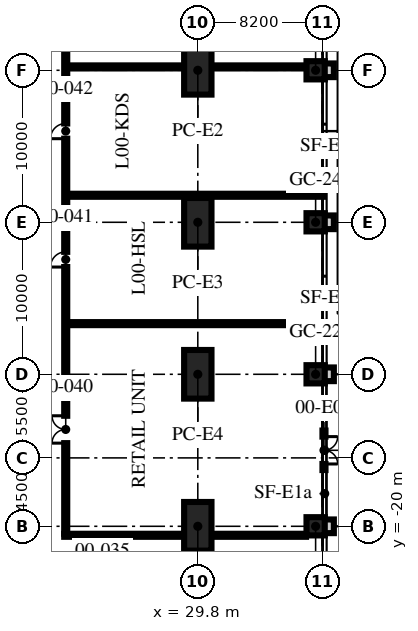
"""IFC4 building model, lengths in metres.
Left out: names, types, materials, properties, quantities, classifications, styles, units other than length and angle.
Written with IfcOpenShell. Run it as: python <this file> out.ifc"""

import sys

from ifc_helpers import new_model, si_unit, direction, frame, frame_2d, origin, origin_2d, place, context, subcontext, project, spatial, rectangle, hollow_rectangle, extrude, element, fill, save


model = new_model("IFC4")
c1 = context("Model", 3, precision=1e-05, world=origin(), true_north=direction((0.0, 1.0)))
c2 = subcontext(c1, "Body", "Model", "MODEL_VIEW")
j1 = project(units=[si_unit("LENGTHUNIT", "METRE"), si_unit("PLANEANGLEUNIT", "RADIAN")], contexts=[c1])
p1 = place(None, origin())
s1 = spatial("IfcSite", under=j1, at=p1, CompositionType="ELEMENT")
p2 = place(p1, origin())
s2 = spatial("IfcBuilding", under=s1, at=p2, CompositionType="ELEMENT")
p3 = place(p2, origin())
s3 = spatial("IfcBuildingStorey", under=s2, at=p3, CompositionType="ELEMENT", Elevation=0.0)
for number, where, z_axis, x_axis in (
    (1, (29.8, 10.0, 0.0), (0.0, 0.0, 1.0), (0.0, 1.0, 0.0)),
    (2, (29.8, 0.0, 0.0), (0.0, 0.0, 1.0), (0.0, 1.0, 0.0)),
    (3, (29.8, -10.0, 0.0), (0.0, 0.0, 1.0), (0.0, 1.0, 0.0)),
    (4, (29.8, -20.0, 0.0), (0.0, 0.0, 1.0), (0.0, 1.0, 0.0)),
):
    element("IfcColumn", number, at=place(p3, frame(where, z_axis=z_axis, x_axis=x_axis)), inside=s3, PredefinedType="COLUMN", context=c2, shape_type="SweptSolid", body=[
        extrude(hollow_rectangle(XDim=3.2, YDim=1.8, WallThickness=0.2, at=origin_2d()), origin(), (0.0, 0.0, 1.0), 6.0),
    ])
for number, where, z_axis, x_axis in (
    (5, (37.55, -20.0, 0.0), (0.0, 0.0, 1.0), (1.0, 0.0, 0.0)),
    (6, (37.55, -10.0, 0.0), (0.0, 0.0, 1.0), (1.0, 0.0, 0.0)),
    (7, (37.55, 0.0, 0.0), (0.0, 0.0, 1.0), (1.0, 0.0, 0.0)),
    (8, (37.55, 10.0, 0.0), (0.0, 0.0, 1.0), (1.0, 0.0, 0.0)),
):
    element("IfcColumn", number, at=place(p3, frame(where, z_axis=z_axis, x_axis=x_axis)), inside=s3, PredefinedType="COLUMN", context=c2, shape_type="SweptSolid", body=[
        extrude(rectangle(XDim=1.2, YDim=1.2, at=origin_2d()), origin(), (0.0, 0.0, 1.0), 6.0),
    ])
for number, where, z_axis, x_axis in (
    (9, (38.375, -20.45, -0.2), (0.0, 0.0, 1.0), (0.0, 1.0, 0.0)),
    (10, (38.375, -10.45, -0.2), (0.0, 0.0, 1.0), (0.0, 1.0, 0.0)),
    (11, (38.375, -0.45, -0.2), (0.0, 0.0, 1.0), (0.0, 1.0, 0.0)),
    (12, (38.375, 9.55, -0.2), (0.0, 0.0, 1.0), (0.0, 1.0, 0.0)),
):
    element("IfcWall", number, at=place(p3, frame(where, z_axis=z_axis, x_axis=x_axis)), inside=s3, PredefinedType="SOLIDWALL", context=c2, shape_type="SweptSolid", body=[
        extrude(rectangle(XDim=0.9, YDim=0.75, at=frame_2d((0.45, 0.0))), origin(), (0.0, 0.0, 1.0), 6.2),
    ])
p4 = place(p3, frame((38.1, -16.3, 0.0), z_axis=(0.0, 0.0, 1.0), x_axis=(0.0, 1.0, 0.0)))
e13 = element("IfcWall", 13, at=p4, inside=s3, PredefinedType="ELEMENTEDWALL", context=c2, shape_type="SweptSolid", body=[
    extrude(rectangle(XDim=2.6, YDim=0.2, at=frame_2d((1.3, 0.0))), origin(), (0.0, 0.0, 1.0), 3.2),
])
p5 = place(p4, frame((2.2, 0.0, 0.0), z_axis=(0.0, 0.0, 1.0), x_axis=(-1.0, 0.0, 0.0)))
e14 = element("IfcOpeningElement", 14, at=p5, cuts=e13, PredefinedType="OPENING", context=c2, shape_type="SweptSolid", body=[
    extrude(rectangle(XDim=1.8, YDim=2.7, at=frame_2d((0.9, 1.35))), frame((0.0, 0.11, 0.0), z_axis=(0.0, -1.0, 0.0), x_axis=(1.0, 0.0, 0.0)), (0.0, 0.0, 1.0), 0.22),
])
p6 = place(p3, frame((21.011, -20.591, 0.0), z_axis=(0.0, 0.0, 1.0), x_axis=(1.0, 0.0, 0.0)))
e15 = element("IfcWall", 15, at=p6, inside=s3, PredefinedType="SOLIDWALL", context=c2, shape_type="SweptSolid", body=[
    extrude(rectangle(XDim=7.859, YDim=0.2, at=frame_2d((3.929, 0.0))), origin(), (0.0, 0.0, 1.0), 4.5),
])
p7 = place(p3, frame((30.73, -20.591, 0.0), z_axis=(0.0, 0.0, 1.0), x_axis=(1.0, 0.0, 0.0)))
e16 = element("IfcWall", 16, at=p7, inside=s3, PredefinedType="SOLIDWALL", context=c2, shape_type="SweptSolid", body=[
    extrude(rectangle(XDim=6.19, YDim=0.2, at=frame_2d((3.095, 0.0))), origin(), (0.0, 0.0, 1.0), 4.7),
])
p8 = place(p3, frame((21.111, -20.491, 0.0), z_axis=(0.0, 0.0, 1.0), x_axis=(0.0, 1.0, 0.0)))
e17 = element("IfcWall", 17, at=p8, inside=s3, PredefinedType="SOLIDWALL", context=c2, shape_type="SweptSolid", body=[
    extrude(rectangle(XDim=42.022, YDim=0.2, at=frame_2d((21.011, 0.0))), origin(), (0.0, 0.0, 1.0), 4.5),
])
p9 = place(p8, frame((5.962, 0.0, 0.0)))
e18 = element("IfcOpeningElement", 18, at=p9, cuts=e17, PredefinedType="OPENING", context=c2, shape_type="SweptSolid", body=[
    extrude(rectangle(XDim=1.8, YDim=2.4, at=frame_2d((0.9, 1.2))), frame((0.0, 0.11, 0.0), z_axis=(0.0, -1.0, 0.0), x_axis=(1.0, 0.0, 0.0)), (0.0, 0.0, 1.0), 0.22),
])
p10 = place(p8, frame((17.546, 0.0, 0.0)))
e19 = element("IfcOpeningElement", 19, at=p10, cuts=e17, PredefinedType="OPENING", context=c2, shape_type="SweptSolid", body=[
    extrude(rectangle(XDim=1.0, YDim=2.1, at=frame_2d((0.5, 1.05))), frame((0.0, 0.11, 0.0), z_axis=(0.0, -1.0, 0.0), x_axis=(1.0, 0.0, 0.0)), (0.0, 0.0, 1.0), 0.22),
])
p11 = place(p8, frame((25.991, 0.0, 0.0)))
e20 = element("IfcOpeningElement", 20, at=p11, cuts=e17, PredefinedType="OPENING", context=c2, shape_type="SweptSolid", body=[
    extrude(rectangle(XDim=1.0, YDim=2.1, at=frame_2d((0.5, 1.05))), frame((0.0, 0.11, 0.0), z_axis=(0.0, -1.0, 0.0), x_axis=(1.0, 0.0, 0.0)), (0.0, 0.0, 1.0), 0.22),
])
p12 = place(p8, frame((35.917, 0.0, 0.0)))
e21 = element("IfcOpeningElement", 21, at=p12, cuts=e17, PredefinedType="OPENING", context=c2, shape_type="SweptSolid", body=[
    extrude(rectangle(XDim=1.0, YDim=2.1, at=frame_2d((0.5, 1.05))), frame((0.0, 0.11, 0.0), z_axis=(0.0, -1.0, 0.0), x_axis=(1.0, 0.0, 0.0)), (0.0, 0.0, 1.0), 0.22),
])
for number, where, z_axis, x_axis in (
    (22, (21.211, -6.667, 0.0), (0.0, 0.0, 1.0), (1.0, 0.0, 0.0)),
    (23, (21.211, 1.778, 0.0), (0.0, 0.0, 1.0), (1.0, 0.0, 0.0)),
):
    element("IfcWall", number, at=place(p3, frame(where, z_axis=z_axis, x_axis=x_axis)), inside=s3, PredefinedType="SOLIDWALL", context=c2, shape_type="SweptSolid", body=[
        extrude(rectangle(XDim=16.864, YDim=0.2, at=frame_2d((8.432, 0.0))), origin(), (0.0, 0.0, 1.0), 4.7),
    ])
p13 = place(p3, frame((21.211, 10.222, 0.0), z_axis=(0.0, 0.0, 1.0), x_axis=(1.0, 0.0, 0.0)))
e24 = element("IfcWall", 24, at=p13, inside=s3, PredefinedType="SOLIDWALL", context=c2, shape_type="SweptSolid", body=[
    extrude(rectangle(XDim=7.659, YDim=0.2, at=frame_2d((3.83, 0.0))), origin(), (0.0, 0.0, 1.0), 4.5),
])
p14 = place(p3, frame((30.73, 10.222, 0.0), z_axis=(0.0, 0.0, 1.0), x_axis=(1.0, 0.0, 0.0)))
e25 = element("IfcWall", 25, at=p14, inside=s3, PredefinedType="SOLIDWALL", context=c2, shape_type="SweptSolid", body=[
    extrude(rectangle(XDim=6.19, YDim=0.2, at=frame_2d((3.095, 0.0))), origin(), (0.0, 0.0, 1.0), 4.7),
])
p15 = place(p5, origin())
e26 = element("IfcDoor", 26, at=p15, inside=s3, OperationType="SINGLE_SWING_LEFT", PredefinedType="DOOR", context=c2, shape_type="SweptSolid", body=[
    extrude(rectangle(XDim=1.8, YDim=2.7, at=frame_2d((0.9, 1.35))), frame((0.0, 0.025, 0.0), z_axis=(0.0, -1.0, 0.0), x_axis=(1.0, 0.0, 0.0)), (0.0, 0.0, 1.0), 0.05),
])
fill(e14, e26)
p16 = place(p9, origin())
e27 = element("IfcDoor", 27, at=p16, inside=s3, OperationType="DOUBLE_DOOR_SINGLE_SWING", PredefinedType="DOOR", context=c2, shape_type="SweptSolid", body=[
    extrude(rectangle(XDim=1.8, YDim=2.4, at=frame_2d((0.9, 1.2))), frame((0.0, 0.025, 0.0), z_axis=(0.0, -1.0, 0.0), x_axis=(1.0, 0.0, 0.0)), (0.0, 0.0, 1.0), 0.05),
])
fill(e18, e27)
p17 = place(p10, origin())
e28 = element("IfcDoor", 28, at=p17, inside=s3, OperationType="SINGLE_SWING_LEFT", PredefinedType="DOOR", context=c2, shape_type="SweptSolid", body=[
    extrude(rectangle(XDim=1.0, YDim=2.1, at=frame_2d((0.5, 1.05))), frame((0.0, 0.025, 0.0), z_axis=(0.0, -1.0, 0.0), x_axis=(1.0, 0.0, 0.0)), (0.0, 0.0, 1.0), 0.05),
])
fill(e19, e28)
p18 = place(p11, origin())
e29 = element("IfcDoor", 29, at=p18, inside=s3, OperationType="SINGLE_SWING_LEFT", PredefinedType="DOOR", context=c2, shape_type="SweptSolid", body=[
    extrude(rectangle(XDim=1.0, YDim=2.1, at=frame_2d((0.5, 1.05))), frame((0.0, 0.025, 0.0), z_axis=(0.0, -1.0, 0.0), x_axis=(1.0, 0.0, 0.0)), (0.0, 0.0, 1.0), 0.05),
])
fill(e20, e29)
save(model, sys.argv[1])
